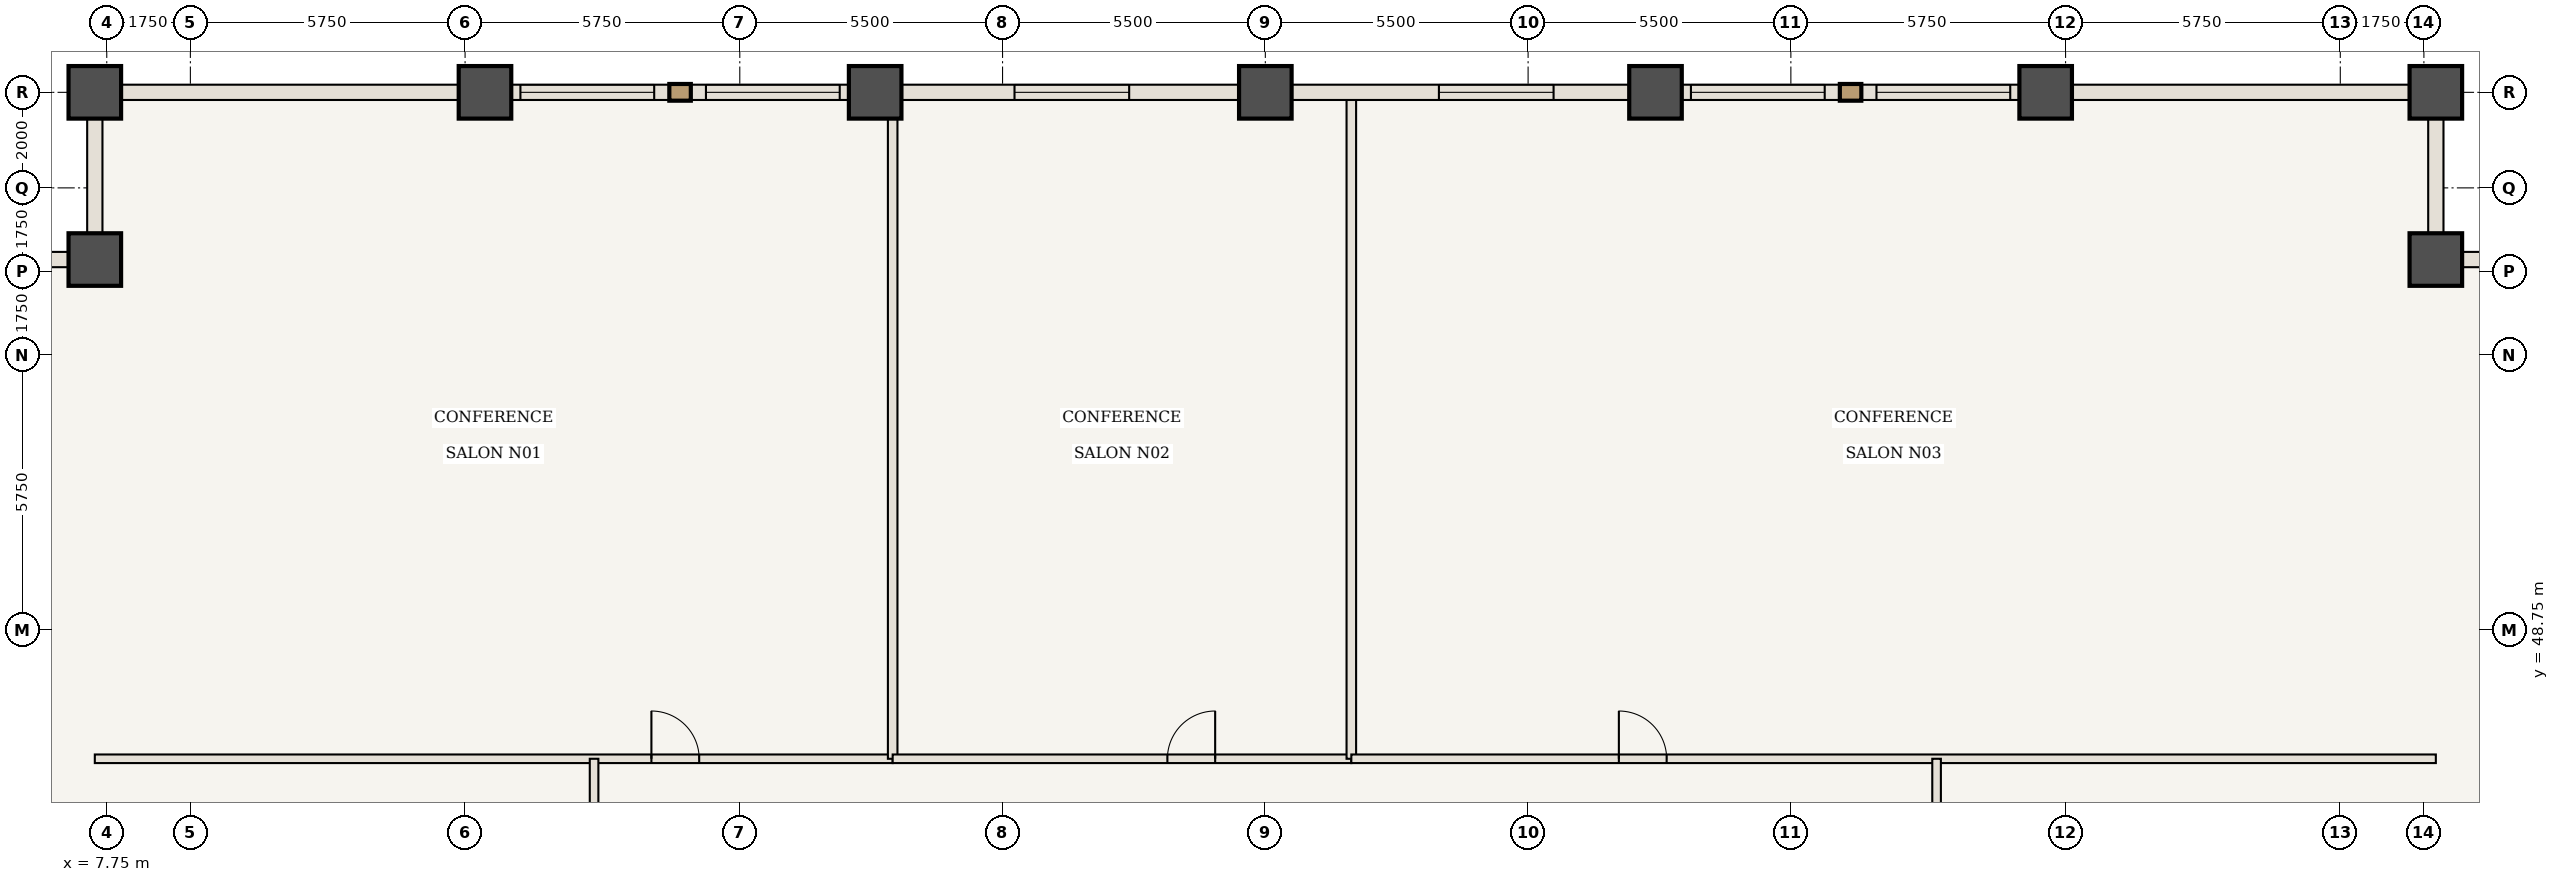
"""IFC4 building model, lengths in metres.
Left out: names, types, materials, properties, quantities, classifications, styles, units other than length and angle.
Written with IfcOpenShell. Run it as: python <this file> out.ifc"""

import sys

from ifc_helpers import new_model, si_unit, direction, frame, frame_2d, origin, origin_2d, place, context, subcontext, project, spatial, rectangle, extrude, element, fill, save


model = new_model("IFC4")
c1 = context("Model", 3, precision=1e-05, world=origin(), true_north=direction((0.0, 1.0)))
c2 = subcontext(c1, "Body", "Model", "MODEL_VIEW")
j1 = project(units=[si_unit("LENGTHUNIT", "METRE"), si_unit("PLANEANGLEUNIT", "RADIAN")], contexts=[c1])
p1 = place(None, origin())
s1 = spatial("IfcSite", under=j1, at=p1, CompositionType="ELEMENT")
p2 = place(p1, origin())
s2 = spatial("IfcBuilding", under=s1, at=p2, CompositionType="ELEMENT")
p3 = place(p2, frame((0.0, 0.0, 66.85)))
s3 = spatial("IfcBuildingStorey", under=s2, at=p3, CompositionType="ELEMENT", Elevation=66.85)
for number, where, z_axis, x_axis in (
    (1, (56.5, 56.5, 0.0), (0.0, 0.0, 1.0), (1.0, 0.0, 0.0)),
    (2, (56.5, 60.0, 0.0), (0.0, 0.0, 1.0), (1.0, 0.0, 0.0)),
    (3, (7.5, 60.0, 0.0), (0.0, 0.0, 1.0), (1.0, 0.0, 0.0)),
    (4, (7.5, 56.5, 0.0), (0.0, 0.0, 1.0), (1.0, 0.0, 0.0)),
    (5, (15.667, 60.0, 0.0), (0.0, 0.0, 1.0), (1.0, 0.0, 0.0)),
    (6, (23.833, 60.0, 0.0), (0.0, 0.0, 1.0), (1.0, 0.0, 0.0)),
    (7, (32.0, 60.0, 0.0), (0.0, 0.0, 1.0), (1.0, 0.0, 0.0)),
    (8, (40.167, 60.0, 0.0), (0.0, 0.0, 1.0), (1.0, 0.0, 0.0)),
    (9, (48.333, 60.0, 0.0), (0.0, 0.0, 1.0), (1.0, 0.0, 0.0)),
):
    element("IfcColumn", number, at=place(p3, frame(where, z_axis=z_axis, x_axis=x_axis)), inside=s3, PredefinedType="COLUMN", context=c2, shape_type="SweptSolid", body=[
        extrude(rectangle(XDim=1.1, YDim=1.1, at=origin_2d()), origin(), (0.0, 0.0, 1.0), 3.5),
    ])
p4 = place(p3, frame((7.5, 46.05, 0.0), z_axis=(0.0, 0.0, 1.0), x_axis=(1.0, 0.0, 0.0)))
e10 = element("IfcWall", 10, at=p4, inside=s3, PredefinedType="STANDARD", context=c2, shape_type="SweptSolid", body=[
    extrude(rectangle(XDim=16.7, YDim=0.18, at=frame_2d((8.35, 0.0))), origin(), (0.0, 0.0, 1.0), 3.32),
])
p5 = place(p4, frame((11.65, 0.0, 0.0)))
e11 = element("IfcOpeningElement", 11, at=p5, cuts=e10, PredefinedType="OPENING", context=c2, shape_type="SweptSolid", body=[
    extrude(rectangle(XDim=1.0, YDim=2.15, at=frame_2d((0.5, 1.075))), frame((0.0, 0.1, 0.0), z_axis=(0.0, -1.0, 0.0), x_axis=(1.0, 0.0, 0.0)), (0.0, 0.0, 1.0), 0.2),
])
p6 = place(p3, frame((24.2, 46.05, 0.0), z_axis=(0.0, 0.0, 1.0), x_axis=(0.0, 1.0, 0.0)))
e12 = element("IfcWall", 12, at=p6, inside=s3, PredefinedType="STANDARD", context=c2, shape_type="SweptSolid", body=[
    extrude(rectangle(XDim=13.89, YDim=0.2, at=frame_2d((6.945, 0.0))), origin(), (0.0, 0.0, 1.0), 3.32),
])
p7 = place(p3, frame((24.2, 46.05, 0.0), z_axis=(0.0, 0.0, 1.0), x_axis=(1.0, 0.0, 0.0)))
e13 = element("IfcWall", 13, at=p7, inside=s3, PredefinedType="STANDARD", context=c2, shape_type="SweptSolid", body=[
    extrude(rectangle(XDim=9.6, YDim=0.18, at=frame_2d((4.8, 0.0))), origin(), (0.0, 0.0, 1.0), 3.32),
])
p8 = place(p7, frame((5.75, 0.0, 0.0)))
e14 = element("IfcOpeningElement", 14, at=p8, cuts=e13, PredefinedType="OPENING", context=c2, shape_type="SweptSolid", body=[
    extrude(rectangle(XDim=1.0, YDim=2.15, at=frame_2d((0.5, 1.075))), frame((0.0, 0.1, 0.0), z_axis=(0.0, -1.0, 0.0), x_axis=(1.0, 0.0, 0.0)), (0.0, 0.0, 1.0), 0.2),
])
p9 = place(p3, frame((33.8, 46.05, 0.0), z_axis=(0.0, 0.0, 1.0), x_axis=(0.0, 1.0, 0.0)))
e15 = element("IfcWall", 15, at=p9, inside=s3, PredefinedType="STANDARD", context=c2, shape_type="SweptSolid", body=[
    extrude(rectangle(XDim=13.89, YDim=0.2, at=frame_2d((6.945, 0.0))), origin(), (0.0, 0.0, 1.0), 3.32),
])
p10 = place(p3, frame((33.8, 46.05, 0.0), z_axis=(0.0, 0.0, 1.0), x_axis=(1.0, 0.0, 0.0)))
e16 = element("IfcWall", 16, at=p10, inside=s3, PredefinedType="STANDARD", context=c2, shape_type="SweptSolid", body=[
    extrude(rectangle(XDim=22.7, YDim=0.18, at=frame_2d((11.35, 0.0))), origin(), (0.0, 0.0, 1.0), 3.32),
])
p11 = place(p10, frame((5.6, 0.0, 0.0)))
e17 = element("IfcOpeningElement", 17, at=p11, cuts=e16, PredefinedType="OPENING", context=c2, shape_type="SweptSolid", body=[
    extrude(rectangle(XDim=1.0, YDim=2.15, at=frame_2d((0.5, 1.075))), frame((0.0, 0.1, 0.0), z_axis=(0.0, -1.0, 0.0), x_axis=(1.0, 0.0, 0.0)), (0.0, 0.0, 1.0), 0.2),
])
p12 = place(p3, frame((17.95, 33.5, 0.0), z_axis=(0.0, 0.0, 1.0), x_axis=(0.0, 1.0, 0.0)))
e18 = element("IfcWall", 18, at=p12, inside=s3, PredefinedType="STANDARD", context=c2, shape_type="SweptSolid", body=[
    extrude(rectangle(XDim=12.55, YDim=0.18, at=frame_2d((6.275, 0.0))), origin(), (0.0, 0.0, 1.0), 3.32),
])
p13 = place(p12, frame((5.775, 0.0, 0.0)))
e19 = element("IfcOpeningElement", 19, at=p13, cuts=e18, PredefinedType="OPENING", context=c2, shape_type="SweptSolid", body=[
    extrude(rectangle(XDim=1.0, YDim=2.15, at=frame_2d((0.5, 1.075))), frame((0.0, 0.1, 0.0), z_axis=(0.0, -1.0, 0.0), x_axis=(1.0, 0.0, 0.0)), (0.0, 0.0, 1.0), 0.2),
])
p14 = place(p3, frame((46.05, 41.9, 0.0), z_axis=(0.0, 0.0, 1.0), x_axis=(0.0, 1.0, 0.0)))
e20 = element("IfcWall", 20, at=p14, inside=s3, PredefinedType="STANDARD", context=c2, shape_type="SweptSolid", body=[
    extrude(rectangle(XDim=4.15, YDim=0.18, at=frame_2d((2.075, 0.0))), origin(), (0.0, 0.0, 1.0), 3.32),
])
p15 = place(p14, frame((1.575, 0.0, 0.0)))
e21 = element("IfcOpeningElement", 21, at=p15, cuts=e20, PredefinedType="OPENING", context=c2, shape_type="SweptSolid", body=[
    extrude(rectangle(XDim=1.0, YDim=2.15, at=frame_2d((0.5, 1.075))), frame((0.0, 0.1, 0.0), z_axis=(0.0, -1.0, 0.0), x_axis=(1.0, 0.0, 0.0)), (0.0, 0.0, 1.0), 0.2),
])
p16 = place(p3, frame((7.5, 60.0, 0.0), z_axis=(0.0, 0.0, 1.0), x_axis=(1.0, 0.0, 0.0)))
e22 = element("IfcWall", 22, at=p16, inside=s3, PredefinedType="USERDEFINED", context=c2, shape_type="SweptSolid", body=[
    extrude(rectangle(XDim=8.167, YDim=0.32, at=frame_2d((4.083, 0.0))), origin(), (0.0, 0.0, 1.0), 2.52),
])
p17 = place(p3, frame((15.667, 60.0, 0.0), z_axis=(0.0, 0.0, 1.0), x_axis=(1.0, 0.0, 0.0)))
e23 = element("IfcWall", 23, at=p17, inside=s3, PredefinedType="USERDEFINED", context=c2, shape_type="SweptSolid", body=[
    extrude(rectangle(XDim=8.167, YDim=0.32, at=frame_2d((4.083, 0.0))), origin(), (0.0, 0.0, 1.0), 2.52),
])
p18 = place(p17, frame((0.742, 0.0, 0.85)))
e24 = element("IfcOpeningElement", 24, at=p18, cuts=e23, PredefinedType="OPENING", context=c2, shape_type="SweptSolid", body=[
    extrude(rectangle(XDim=2.8, YDim=1.47, at=frame_2d((1.4, 0.735))), frame((0.0, 0.17, 0.0), z_axis=(0.0, -1.0, 0.0), x_axis=(1.0, 0.0, 0.0)), (0.0, 0.0, 1.0), 0.34),
])
p19 = place(p17, frame((4.625, 0.0, 0.85)))
e25 = element("IfcOpeningElement", 25, at=p19, cuts=e23, PredefinedType="OPENING", context=c2, shape_type="SweptSolid", body=[
    extrude(rectangle(XDim=2.8, YDim=1.47, at=frame_2d((1.4, 0.735))), frame((0.0, 0.17, 0.0), z_axis=(0.0, -1.0, 0.0), x_axis=(1.0, 0.0, 0.0)), (0.0, 0.0, 1.0), 0.34),
])
p20 = place(p3, frame((23.833, 60.0, 0.0), z_axis=(0.0, 0.0, 1.0), x_axis=(1.0, 0.0, 0.0)))
e26 = element("IfcWall", 26, at=p20, inside=s3, PredefinedType="USERDEFINED", context=c2, shape_type="SweptSolid", body=[
    extrude(rectangle(XDim=8.167, YDim=0.32, at=frame_2d((4.083, 0.0))), origin(), (0.0, 0.0, 1.0), 2.52),
])
p21 = place(p20, frame((2.917, 0.0, 0.85)))
e27 = element("IfcOpeningElement", 27, at=p21, cuts=e26, PredefinedType="OPENING", context=c2, shape_type="SweptSolid", body=[
    extrude(rectangle(XDim=2.4, YDim=1.47, at=frame_2d((1.2, 0.735))), frame((0.0, 0.17, 0.0), z_axis=(0.0, -1.0, 0.0), x_axis=(1.0, 0.0, 0.0)), (0.0, 0.0, 1.0), 0.34),
])
p22 = place(p3, frame((32.0, 60.0, 0.0), z_axis=(0.0, 0.0, 1.0), x_axis=(1.0, 0.0, 0.0)))
e28 = element("IfcWall", 28, at=p22, inside=s3, PredefinedType="USERDEFINED", context=c2, shape_type="SweptSolid", body=[
    extrude(rectangle(XDim=8.167, YDim=0.32, at=frame_2d((4.083, 0.0))), origin(), (0.0, 0.0, 1.0), 2.52),
])
p23 = place(p22, frame((3.633, 0.0, 0.85)))
e29 = element("IfcOpeningElement", 29, at=p23, cuts=e28, PredefinedType="OPENING", context=c2, shape_type="SweptSolid", body=[
    extrude(rectangle(XDim=2.4, YDim=1.47, at=frame_2d((1.2, 0.735))), frame((0.0, 0.17, 0.0), z_axis=(0.0, -1.0, 0.0), x_axis=(1.0, 0.0, 0.0)), (0.0, 0.0, 1.0), 0.34),
])
p24 = place(p3, frame((40.167, 60.0, 0.0), z_axis=(0.0, 0.0, 1.0), x_axis=(1.0, 0.0, 0.0)))
e30 = element("IfcWall", 30, at=p24, inside=s3, PredefinedType="USERDEFINED", context=c2, shape_type="SweptSolid", body=[
    extrude(rectangle(XDim=8.167, YDim=0.32, at=frame_2d((4.083, 0.0))), origin(), (0.0, 0.0, 1.0), 2.52),
])
p25 = place(p24, frame((0.742, 0.0, 0.85)))
e31 = element("IfcOpeningElement", 31, at=p25, cuts=e30, PredefinedType="OPENING", context=c2, shape_type="SweptSolid", body=[
    extrude(rectangle(XDim=2.8, YDim=1.47, at=frame_2d((1.4, 0.735))), frame((0.0, 0.17, 0.0), z_axis=(0.0, -1.0, 0.0), x_axis=(1.0, 0.0, 0.0)), (0.0, 0.0, 1.0), 0.34),
])
p26 = place(p24, frame((4.625, 0.0, 0.85)))
e32 = element("IfcOpeningElement", 32, at=p26, cuts=e30, PredefinedType="OPENING", context=c2, shape_type="SweptSolid", body=[
    extrude(rectangle(XDim=2.8, YDim=1.47, at=frame_2d((1.4, 0.735))), frame((0.0, 0.17, 0.0), z_axis=(0.0, -1.0, 0.0), x_axis=(1.0, 0.0, 0.0)), (0.0, 0.0, 1.0), 0.34),
])
p27 = place(p3, frame((48.333, 60.0, 0.0), z_axis=(0.0, 0.0, 1.0), x_axis=(1.0, 0.0, 0.0)))
e33 = element("IfcWall", 33, at=p27, inside=s3, PredefinedType="USERDEFINED", context=c2, shape_type="SweptSolid", body=[
    extrude(rectangle(XDim=8.167, YDim=0.32, at=frame_2d((4.083, 0.0))), origin(), (0.0, 0.0, 1.0), 2.52),
])
for number, where, z_axis, x_axis in (
    (34, (56.5, 56.5, 0.0), (0.0, 0.0, 1.0), (1.0, 0.0, 0.0)),
    (35, (56.5, 60.0, 0.0), (0.0, 0.0, 1.0), (0.0, -1.0, 0.0)),
    (36, (7.5, 56.5, 0.0), (0.0, 0.0, 1.0), (0.0, 1.0, 0.0)),
    (37, (4.0, 56.5, 0.0), (0.0, 0.0, 1.0), (1.0, 0.0, 0.0)),
):
    element("IfcWall", number, at=place(p3, frame(where, z_axis=z_axis, x_axis=x_axis)), inside=s3, PredefinedType="USERDEFINED", context=c2, shape_type="SweptSolid", body=[
        extrude(rectangle(XDim=3.5, YDim=0.32, at=frame_2d((1.75, 0.0))), origin(), (0.0, 0.0, 1.0), 2.52),
    ])
p28 = place(p5, origin())
e38 = element("IfcDoor", 38, at=p28, inside=s3, OperationType="SINGLE_SWING_LEFT", PredefinedType="DOOR", context=c2, shape_type="SweptSolid", body=[
    extrude(rectangle(XDim=1.0, YDim=2.15, at=frame_2d((0.5, 1.075))), frame((0.0, 0.025, 0.0), z_axis=(0.0, -1.0, 0.0), x_axis=(1.0, 0.0, 0.0)), (0.0, 0.0, 1.0), 0.05),
])
fill(e11, e38)
p29 = place(p8, origin())
e39 = element("IfcDoor", 39, at=p29, inside=s3, OperationType="SINGLE_SWING_RIGHT", PredefinedType="DOOR", context=c2, shape_type="SweptSolid", body=[
    extrude(rectangle(XDim=1.0, YDim=2.15, at=frame_2d((0.5, 1.075))), frame((0.0, 0.025, 0.0), z_axis=(0.0, -1.0, 0.0), x_axis=(1.0, 0.0, 0.0)), (0.0, 0.0, 1.0), 0.05),
])
fill(e14, e39)
p30 = place(p11, origin())
e40 = element("IfcDoor", 40, at=p30, inside=s3, OperationType="SINGLE_SWING_LEFT", PredefinedType="DOOR", context=c2, shape_type="SweptSolid", body=[
    extrude(rectangle(XDim=1.0, YDim=2.15, at=frame_2d((0.5, 1.075))), frame((0.0, 0.025, 0.0), z_axis=(0.0, -1.0, 0.0), x_axis=(1.0, 0.0, 0.0)), (0.0, 0.0, 1.0), 0.05),
])
fill(e17, e40)
p31 = place(p18, origin())
e41 = element("IfcWindow", 41, at=p31, inside=s3, PartitioningType="SINGLE_PANEL", PredefinedType="WINDOW", context=c2, shape_type="SweptSolid", body=[
    extrude(rectangle(XDim=2.8, YDim=1.47, at=frame_2d((1.4, 0.735))), frame((0.0, 0.03, 0.0), z_axis=(0.0, -1.0, 0.0), x_axis=(1.0, 0.0, 0.0)), (0.0, 0.0, 1.0), 0.06),
])
fill(e24, e41)
p32 = place(p19, origin())
e42 = element("IfcWindow", 42, at=p32, inside=s3, PartitioningType="SINGLE_PANEL", PredefinedType="WINDOW", context=c2, shape_type="SweptSolid", body=[
    extrude(rectangle(XDim=2.8, YDim=1.47, at=frame_2d((1.4, 0.735))), frame((0.0, 0.03, 0.0), z_axis=(0.0, -1.0, 0.0), x_axis=(1.0, 0.0, 0.0)), (0.0, 0.0, 1.0), 0.06),
])
fill(e25, e42)
p33 = place(p21, origin())
e43 = element("IfcWindow", 43, at=p33, inside=s3, PartitioningType="SINGLE_PANEL", PredefinedType="WINDOW", context=c2, shape_type="SweptSolid", body=[
    extrude(rectangle(XDim=2.4, YDim=1.47, at=frame_2d((1.2, 0.735))), frame((0.0, 0.03, 0.0), z_axis=(0.0, -1.0, 0.0), x_axis=(1.0, 0.0, 0.0)), (0.0, 0.0, 1.0), 0.06),
])
fill(e27, e43)
p34 = place(p23, origin())
e44 = element("IfcWindow", 44, at=p34, inside=s3, PartitioningType="SINGLE_PANEL", PredefinedType="WINDOW", context=c2, shape_type="SweptSolid", body=[
    extrude(rectangle(XDim=2.4, YDim=1.47, at=frame_2d((1.2, 0.735))), frame((0.0, 0.03, 0.0), z_axis=(0.0, -1.0, 0.0), x_axis=(1.0, 0.0, 0.0)), (0.0, 0.0, 1.0), 0.06),
])
fill(e29, e44)
p35 = place(p25, origin())
e45 = element("IfcWindow", 45, at=p35, inside=s3, PartitioningType="SINGLE_PANEL", PredefinedType="WINDOW", context=c2, shape_type="SweptSolid", body=[
    extrude(rectangle(XDim=2.8, YDim=1.47, at=frame_2d((1.4, 0.735))), frame((0.0, 0.03, 0.0), z_axis=(0.0, -1.0, 0.0), x_axis=(1.0, 0.0, 0.0)), (0.0, 0.0, 1.0), 0.06),
])
fill(e31, e45)
p36 = place(p26, origin())
e46 = element("IfcWindow", 46, at=p36, inside=s3, PartitioningType="SINGLE_PANEL", PredefinedType="WINDOW", context=c2, shape_type="SweptSolid", body=[
    extrude(rectangle(XDim=2.8, YDim=1.47, at=frame_2d((1.4, 0.735))), frame((0.0, 0.03, 0.0), z_axis=(0.0, -1.0, 0.0), x_axis=(1.0, 0.0, 0.0)), (0.0, 0.0, 1.0), 0.06),
])
fill(e32, e46)
save(model, sys.argv[1])
